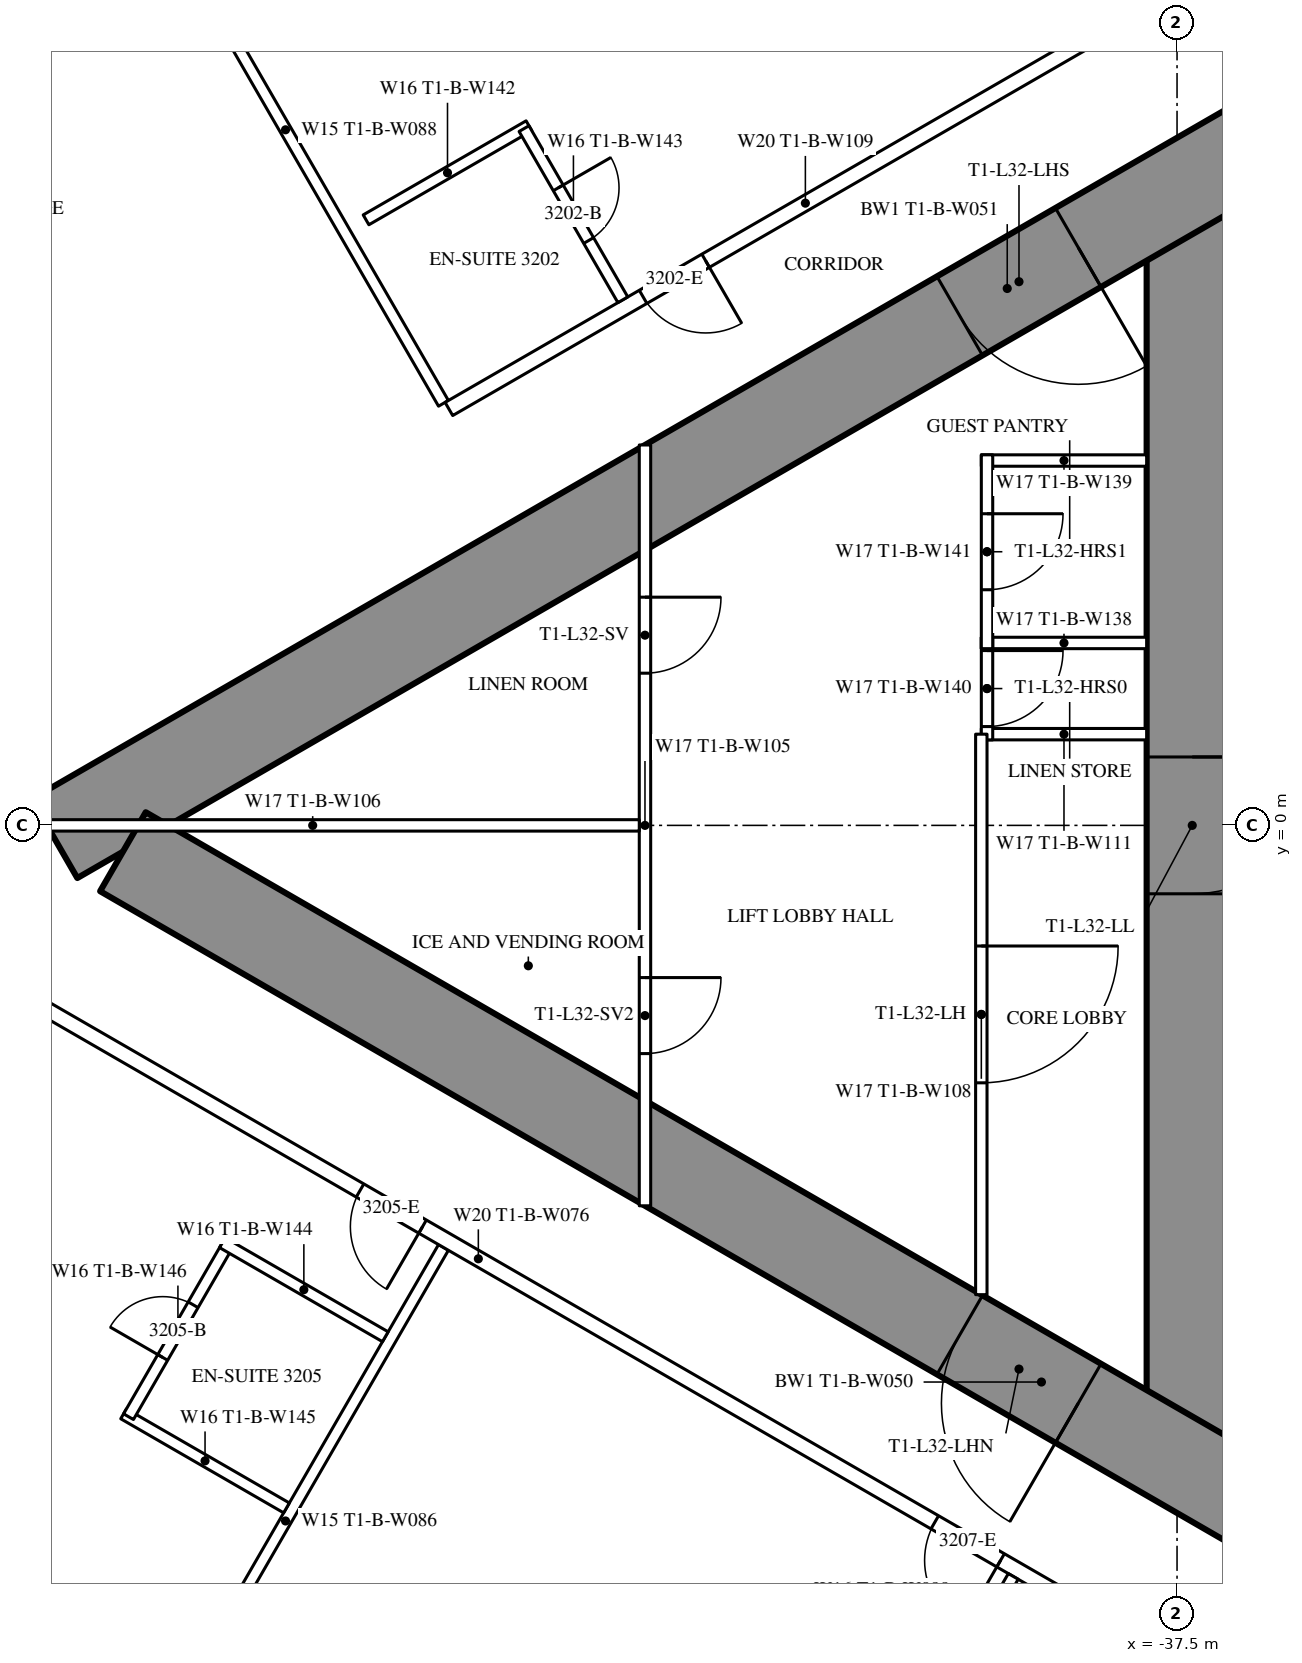
"""IFC4 building model, lengths in metres.
Left out: names, types, materials, properties, quantities, classifications, styles, units other than length and angle.
Written with IfcOpenShell. Run it as: python <this file> out.ifc"""

import sys

from ifc_helpers import new_model, si_unit, direction, frame, frame_2d, origin, place, context, subcontext, project, spatial, rectangle, extrude, element, fill, save


model = new_model("IFC4")
c1 = context("Model", 3, precision=1e-05, world=origin(), true_north=direction((0.0, 1.0)))
c2 = subcontext(c1, "Body", "Model", "MODEL_VIEW")
j1 = project(units=[si_unit("LENGTHUNIT", "METRE"), si_unit("PLANEANGLEUNIT", "RADIAN")], contexts=[c1])
p1 = place(None, origin())
s1 = spatial("IfcSite", under=j1, at=p1, CompositionType="ELEMENT")
p2 = place(p1, origin())
s2 = spatial("IfcBuilding", under=s1, at=p2, CompositionType="ELEMENT")
p3 = place(p2, frame((0.0, 0.0, 122.1)))
s3 = spatial("IfcBuildingStorey", under=s2, at=p3, CompositionType="ELEMENT", Elevation=122.1)
p4 = place(p3, frame((-37.3, 8.6, 0.0), z_axis=(0.0, 0.0, 1.0), x_axis=(0.0, -1.0, 0.0)))
e1 = element("IfcWall", 1, at=p4, inside=s3, PredefinedType="SHEAR", context=c2, shape_type="SweptSolid", body=[
    extrude(rectangle(XDim=17.2, YDim=1.2, at=frame_2d((8.6, 0.0))), origin(), (0.0, 0.0, 1.0), 3.5),
])
p5 = place(p4, frame((7.7, 0.0, 0.0)))
e2 = element("IfcOpeningElement", 2, at=p5, cuts=e1, PredefinedType="OPENING", context=c2, shape_type="SweptSolid", body=[
    extrude(rectangle(XDim=1.8, YDim=2.2, at=frame_2d((0.9, 1.1))), frame((0.0, 0.61, 0.0), z_axis=(0.0, -1.0, 0.0), x_axis=(1.0, 0.0, 0.0)), (0.0, 0.0, 1.0), 1.22),
])
p6 = place(p3, frame((-27.2, 14.3, 0.0), z_axis=(0.0, 0.0, 1.0), x_axis=(-0.866026593062, -0.499997940104, 0.0)))
e3 = element("IfcWall", 3, at=p6, inside=s3, PredefinedType="SHEAR", context=c2, shape_type="SweptSolid", body=[
    extrude(rectangle(XDim=28.946, YDim=1.2, at=frame_2d((14.473, 0.0))), origin(), (0.0, 0.0, 1.0), 3.5),
])
p7 = place(p6, frame((4.6, 0.0, 0.0)))
e4 = element("IfcOpeningElement", 4, at=p7, cuts=e3, PredefinedType="OPENING", context=c2, shape_type="SweptSolid", body=[
    extrude(rectangle(XDim=1.0, YDim=2.2, at=frame_2d((0.5, 1.1))), frame((0.0, 0.61, 0.0), z_axis=(0.0, -1.0, 0.0), x_axis=(1.0, 0.0, 0.0)), (0.0, 0.0, 1.0), 1.22),
])
p8 = place(p6, frame((13.395, 0.0, 0.0)))
e5 = element("IfcOpeningElement", 5, at=p8, cuts=e3, PredefinedType="OPENING", context=c2, shape_type="SweptSolid", body=[
    extrude(rectangle(XDim=1.8, YDim=2.2, at=frame_2d((0.9, 1.1))), frame((0.0, 0.61, 0.0), z_axis=(0.0, -1.0, 0.0), x_axis=(1.0, 0.0, 0.0)), (0.0, 0.0, 1.0), 1.22),
])
p9 = place(p3, frame((-27.2, -14.3, 0.0), z_axis=(0.0, 0.0, 1.0), x_axis=(-0.866024021859, 0.500002393557, 0.0)))
e6 = element("IfcWall", 6, at=p9, inside=s3, PredefinedType="SHEAR", context=c2, shape_type="SweptSolid", body=[
    extrude(rectangle(XDim=27.907, YDim=1.2, at=frame_2d((13.954, 0.0))), origin(), (0.0, 0.0, 1.0), 3.5),
])
p10 = place(p9, frame((4.6, 0.0, 0.0)))
e7 = element("IfcOpeningElement", 7, at=p10, cuts=e6, PredefinedType="OPENING", context=c2, shape_type="SweptSolid", body=[
    extrude(rectangle(XDim=1.0, YDim=2.2, at=frame_2d((0.5, 1.1))), frame((0.0, 0.61, 0.0), z_axis=(0.0, -1.0, 0.0), x_axis=(1.0, 0.0, 0.0)), (0.0, 0.0, 1.0), 1.22),
])
p11 = place(p9, frame((13.395, 0.0, 0.0)))
e8 = element("IfcOpeningElement", 8, at=p11, cuts=e6, PredefinedType="OPENING", context=c2, shape_type="SweptSolid", body=[
    extrude(rectangle(XDim=1.8, YDim=2.2, at=frame_2d((0.9, 1.1))), frame((0.0, 0.61, 0.0), z_axis=(0.0, -1.0, 0.0), x_axis=(1.0, 0.0, 0.0)), (0.0, 0.0, 1.0), 1.22),
])
for number, where, z_axis, x_axis in (
    (9, (-47.151, 5.552, 0.0), (0.0, 0.0, 1.0), (-0.5, 0.866, 0.0)),
    (10, (-47.151, -5.552, 0.0), (0.0, 0.0, 1.0), (-0.5, -0.866, 0.0)),
):
    element("IfcWall", number, at=place(p3, frame(where, z_axis=z_axis, x_axis=x_axis)), inside=s3, PredefinedType="PARTITIONING", context=c2, shape_type="SweptSolid", body=[
        extrude(rectangle(XDim=8.311, YDim=0.15, at=frame_2d((4.156, 0.0))), origin(), (0.0, 0.0, 1.0), 2.2),
    ])
p12 = place(p3, frame((-36.92, -11.344, 0.0), z_axis=(0.0, 0.0, 1.0), x_axis=(-0.866028313256, 0.499994960614, 0.0)))
e11 = element("IfcWall", 11, at=p12, inside=s3, PredefinedType="PARTITIONING", context=c2, shape_type="SweptSolid", body=[
    extrude(rectangle(XDim=22.568, YDim=0.2, at=frame_2d((11.284, 0.0))), origin(), (0.0, 0.0, 1.0), 3.25),
])
p13 = place(p12, frame((12.131, 0.0, 0.0)))
e12 = element("IfcOpeningElement", 12, at=p13, cuts=e11, PredefinedType="OPENING", context=c2, shape_type="SweptSolid", body=[
    extrude(rectangle(XDim=0.95, YDim=2.2, at=frame_2d((0.475, 1.1))), frame((0.0, 0.11, 0.0), z_axis=(0.0, -1.0, 0.0), x_axis=(1.0, 0.0, 0.0)), (0.0, 0.0, 1.0), 0.22),
])
p14 = place(p12, frame((3.35, 0.0, 0.0)))
e13 = element("IfcOpeningElement", 13, at=p14, cuts=e11, PredefinedType="OPENING", context=c2, shape_type="SweptSolid", body=[
    extrude(rectangle(XDim=1.0, YDim=2.2, at=frame_2d((0.5, 1.1))), frame((0.0, 0.11, 0.0), z_axis=(0.0, -1.0, 0.0), x_axis=(1.0, 0.0, 0.0)), (0.0, 0.0, 1.0), 0.22),
])
p15 = place(p3, frame((-37.7, 10.894, 0.0), z_axis=(0.0, 0.0, 1.0), x_axis=(-0.866027551079, -0.499996280759, 0.0)))
e14 = element("IfcWall", 14, at=p15, inside=s3, PredefinedType="PARTITIONING", context=c2, shape_type="SweptSolid", body=[
    extrude(rectangle(XDim=10.831, YDim=0.2, at=frame_2d((5.415, 0.0))), origin(), (0.0, 0.0, 1.0), 3.25),
])
p16 = place(p15, frame((6.93, 0.0, 0.0)))
e15 = element("IfcOpeningElement", 15, at=p16, cuts=e14, PredefinedType="OPENING", context=c2, shape_type="SweptSolid", body=[
    extrude(rectangle(XDim=0.95, YDim=2.2, at=frame_2d((0.475, 1.1))), frame((0.0, 0.11, 0.0), z_axis=(0.0, -1.0, 0.0), x_axis=(1.0, 0.0, 0.0)), (0.0, 0.0, 1.0), 0.22),
])
p17 = place(p3, frame((-49.216, -8.979, 0.0), z_axis=(0.0, 0.0, 1.0), x_axis=(-0.866031185235, 0.4999899861, 0.0)))
e16 = element("IfcWall", 16, at=p17, inside=s3, PredefinedType="PARTITIONING", context=c2, shape_type="SweptSolid", body=[
    extrude(rectangle(XDim=2.475, YDim=0.15, at=frame_2d((1.238, 0.0))), origin(), (0.0, 0.0, 1.0), 3.25),
])
p18 = place(p3, frame((-49.995, -5.527, 0.0), z_axis=(0.0, 0.0, 1.0), x_axis=(-0.500006934395, -0.866021400173, 0.0)))
e17 = element("IfcWall", 17, at=p18, inside=s3, PredefinedType="PARTITIONING", context=c2, shape_type="SweptSolid", body=[
    extrude(rectangle(XDim=2.6, YDim=0.15, at=frame_2d((1.3, 0.0))), origin(), (0.0, 0.0, 1.0), 3.25),
])
p19 = place(p18, frame((0.9, 0.0, 0.0)))
e18 = element("IfcOpeningElement", 18, at=p19, cuts=e17, PredefinedType="OPENING", context=c2, shape_type="SweptSolid", body=[
    extrude(rectangle(XDim=0.8, YDim=2.2, at=frame_2d((0.4, 1.1))), frame((0.0, 0.085, 0.0), z_axis=(0.0, -1.0, 0.0), x_axis=(1.0, 0.0, 0.0)), (0.0, 0.0, 1.0), 0.17),
])
p20 = place(p3, frame((-47.916, -6.727, 0.0), z_axis=(0.0, 0.0, 1.0), x_axis=(-0.866031185235, 0.4999899861, 0.0)))
e19 = element("IfcWall", 19, at=p20, inside=s3, PredefinedType="PARTITIONING", context=c2, shape_type="SweptSolid", body=[
    extrude(rectangle(XDim=2.475, YDim=0.15, at=frame_2d((1.238, 0.0))), origin(), (0.0, 0.0, 1.0), 3.25),
])
p21 = place(p3, frame((-46.026, 9.204, 0.0), z_axis=(0.0, 0.0, 1.0), x_axis=(-0.866006523861, -0.500032699561, 0.0)))
e20 = element("IfcWall", 20, at=p21, inside=s3, PredefinedType="PARTITIONING", context=c2, shape_type="SweptSolid", body=[
    extrude(rectangle(XDim=2.475, YDim=0.15, at=frame_2d((1.237, 0.0))), origin(), (0.0, 0.0, 1.0), 3.25),
])
p22 = place(p3, frame((-44.791, 6.915, 0.0), z_axis=(0.0, 0.0, 1.0), x_axis=(-0.500047596559, 0.865997922154, 0.0)))
e21 = element("IfcWall", 21, at=p22, inside=s3, PredefinedType="PARTITIONING", context=c2, shape_type="SweptSolid", body=[
    extrude(rectangle(XDim=2.6, YDim=0.15, at=frame_2d((1.3, 0.0))), origin(), (0.0, 0.0, 1.0), 3.25),
])
p23 = place(p22, frame((0.9, 0.0, 0.0)))
e22 = element("IfcOpeningElement", 22, at=p23, cuts=e21, PredefinedType="OPENING", context=c2, shape_type="SweptSolid", body=[
    extrude(rectangle(XDim=0.8, YDim=2.2, at=frame_2d((0.4, 1.1))), frame((0.0, 0.085, 0.0), z_axis=(0.0, -1.0, 0.0), x_axis=(1.0, 0.0, 0.0)), (0.0, 0.0, 1.0), 0.17),
])
p24 = place(p3, frame((-39.655, -9.88, 0.0), z_axis=(0.0, 0.0, 1.0), x_axis=(-0.500049511043, -0.865996816683, 0.0)))
e23 = element("IfcWall", 23, at=p24, inside=s3, PredefinedType="PARTITIONING", context=c2, shape_type="SweptSolid", body=[
    extrude(rectangle(XDim=2.8, YDim=0.15, at=frame_2d((1.4, 0.0))), origin(), (0.0, 0.0, 1.0), 3.25),
])
p25 = place(p24, frame((1.55, 0.0, 0.0)))
e24 = element("IfcOpeningElement", 24, at=p25, cuts=e23, PredefinedType="OPENING", context=c2, shape_type="SweptSolid", body=[
    extrude(rectangle(XDim=1.0, YDim=2.2, at=frame_2d((0.5, 1.1))), frame((0.0, 0.085, 0.0), z_axis=(0.0, -1.0, 0.0), x_axis=(1.0, 0.0, 0.0)), (0.0, 0.0, 1.0), 0.17),
])
for number, where, z_axis, x_axis in (
    (25, (-37.9, 1.2, 0.0), (0.0, 0.0, 1.0), (-1.0, 0.0, 0.0)),
    (26, (-37.9, 2.4, 0.0), (0.0, 0.0, 1.0), (-1.0, 0.0, 0.0)),
    (27, (-37.9, 4.8, 0.0), (0.0, 0.0, 1.0), (-1.0, 0.0, 0.0)),
):
    element("IfcWall", number, at=place(p3, frame(where, z_axis=z_axis, x_axis=x_axis)), inside=s3, PredefinedType="PARTITIONING", context=c2, shape_type="SweptSolid", body=[
        extrude(rectangle(XDim=2.175, YDim=0.15, at=frame_2d((1.087, 0.0))), origin(), (0.0, 0.0, 1.0), 3.25),
    ])
p26 = place(p3, frame((-40.0, 2.475, 0.0), z_axis=(0.0, 0.0, 1.0), x_axis=(0.0, -1.0, 0.0)))
e28 = element("IfcWall", 28, at=p26, inside=s3, PredefinedType="PARTITIONING", context=c2, shape_type="SweptSolid", body=[
    extrude(rectangle(XDim=1.35, YDim=0.15, at=frame_2d((0.675, 0.0))), origin(), (0.0, 0.0, 1.0), 3.25),
])
p27 = place(p26, frame((0.175, 0.0, 0.0)))
e29 = element("IfcOpeningElement", 29, at=p27, cuts=e28, PredefinedType="OPENING", context=c2, shape_type="SweptSolid", body=[
    extrude(rectangle(XDim=1.0, YDim=2.2, at=frame_2d((0.5, 1.1))), frame((0.0, 0.085, 0.0), z_axis=(0.0, -1.0, 0.0), x_axis=(1.0, 0.0, 0.0)), (0.0, 0.0, 1.0), 0.17),
])
p28 = place(p3, frame((-40.0, 4.875, 0.0), z_axis=(0.0, 0.0, 1.0), x_axis=(0.0, -1.0, 0.0)))
e30 = element("IfcWall", 30, at=p28, inside=s3, PredefinedType="PARTITIONING", context=c2, shape_type="SweptSolid", body=[
    extrude(rectangle(XDim=2.55, YDim=0.15, at=frame_2d((1.275, 0.0))), origin(), (0.0, 0.0, 1.0), 3.25),
])
p29 = place(p28, frame((0.775, 0.0, 0.0)))
e31 = element("IfcOpeningElement", 31, at=p29, cuts=e30, PredefinedType="OPENING", context=c2, shape_type="SweptSolid", body=[
    extrude(rectangle(XDim=1.0, YDim=2.2, at=frame_2d((0.5, 1.1))), frame((0.0, 0.085, 0.0), z_axis=(0.0, -1.0, 0.0), x_axis=(1.0, 0.0, 0.0)), (0.0, 0.0, 1.0), 0.17),
])
p30 = place(p3, frame((-40.075, 1.2, 0.0), z_axis=(0.0, 0.0, 1.0), x_axis=(0.0, -1.0, 0.0)))
e32 = element("IfcWall", 32, at=p30, inside=s3, PredefinedType="PARTITIONING", context=c2, shape_type="SweptSolid", body=[
    extrude(rectangle(XDim=7.374, YDim=0.15, at=frame_2d((3.687, 0.0))), origin(), (0.0, 0.0, 1.0), 3.25),
])
p31 = place(p30, frame((2.787, 0.0, 0.0)))
e33 = element("IfcOpeningElement", 33, at=p31, cuts=e32, PredefinedType="OPENING", context=c2, shape_type="SweptSolid", body=[
    extrude(rectangle(XDim=1.8, YDim=2.2, at=frame_2d((0.9, 1.1))), frame((0.0, 0.085, 0.0), z_axis=(0.0, -1.0, 0.0), x_axis=(1.0, 0.0, 0.0)), (0.0, 0.0, 1.0), 0.17),
])
p32 = place(p3, frame((-44.5, 5.005, 0.0), z_axis=(0.0, 0.0, 1.0), x_axis=(0.0, -1.0, 0.0)))
e34 = element("IfcWall", 34, at=p32, inside=s3, PredefinedType="PARTITIONING", context=c2, shape_type="SweptSolid", body=[
    extrude(rectangle(XDim=10.009, YDim=0.15, at=frame_2d((5.005, 0.0))), origin(), (0.0, 0.0, 1.0), 2.45),
])
p33 = place(p32, frame((2.002, 0.0, 0.0)))
e35 = element("IfcOpeningElement", 35, at=p33, cuts=e34, PredefinedType="OPENING", context=c2, shape_type="SweptSolid", body=[
    extrude(rectangle(XDim=1.0, YDim=2.2, at=frame_2d((0.5, 1.1))), frame((0.0, 0.085, 0.0), z_axis=(0.0, -1.0, 0.0), x_axis=(1.0, 0.0, 0.0)), (0.0, 0.0, 1.0), 0.17),
])
p34 = place(p32, frame((7.007, 0.0, 0.0)))
e36 = element("IfcOpeningElement", 36, at=p34, cuts=e34, PredefinedType="OPENING", context=c2, shape_type="SweptSolid", body=[
    extrude(rectangle(XDim=1.0, YDim=2.2, at=frame_2d((0.5, 1.1))), frame((0.0, 0.085, 0.0), z_axis=(0.0, -1.0, 0.0), x_axis=(1.0, 0.0, 0.0)), (0.0, 0.0, 1.0), 0.17),
])
p35 = place(p3, frame((-44.575, 0.0, 0.0), z_axis=(0.0, 0.0, 1.0), x_axis=(-1.0, 0.0, 0.0)))
e37 = element("IfcWall", 37, at=p35, inside=s3, PredefinedType="PARTITIONING", context=c2, shape_type="SweptSolid", body=[
    extrude(rectangle(XDim=8.593, YDim=0.15, at=frame_2d((4.297, 0.0))), origin(), (0.0, 0.0, 1.0), 2.2),
])
p36 = place(p19, origin())
e38 = element("IfcDoor", 38, at=p36, inside=s3, OperationType="SINGLE_SWING_RIGHT", PredefinedType="DOOR", context=c2, shape_type="SweptSolid", body=[
    extrude(rectangle(XDim=0.8, YDim=2.2, at=frame_2d((0.4, 1.1))), frame((0.0, 0.025, 0.0), z_axis=(0.0, -1.0, 0.0), x_axis=(1.0, 0.0, 0.0)), (0.0, 0.0, 1.0), 0.05),
])
fill(e18, e38)
p37 = place(p13, origin())
e39 = element("IfcDoor", 39, at=p37, inside=s3, OperationType="SINGLE_SWING_LEFT", PredefinedType="DOOR", context=c2, shape_type="SweptSolid", body=[
    extrude(rectangle(XDim=0.95, YDim=2.2, at=frame_2d((0.475, 1.1))), frame((0.0, 0.025, 0.0), z_axis=(0.0, -1.0, 0.0), x_axis=(1.0, 0.0, 0.0)), (0.0, 0.0, 1.0), 0.05),
])
fill(e12, e39)
p38 = place(p23, origin())
e40 = element("IfcDoor", 40, at=p38, inside=s3, OperationType="SINGLE_SWING_RIGHT", PredefinedType="DOOR", context=c2, shape_type="SweptSolid", body=[
    extrude(rectangle(XDim=0.8, YDim=2.2, at=frame_2d((0.4, 1.1))), frame((0.0, 0.025, 0.0), z_axis=(0.0, -1.0, 0.0), x_axis=(1.0, 0.0, 0.0)), (0.0, 0.0, 1.0), 0.05),
])
fill(e22, e40)
p39 = place(p16, origin())
e41 = element("IfcDoor", 41, at=p39, inside=s3, OperationType="SINGLE_SWING_LEFT", PredefinedType="DOOR", context=c2, shape_type="SweptSolid", body=[
    extrude(rectangle(XDim=0.95, YDim=2.2, at=frame_2d((0.475, 1.1))), frame((0.0, 0.025, 0.0), z_axis=(0.0, -1.0, 0.0), x_axis=(1.0, 0.0, 0.0)), (0.0, 0.0, 1.0), 0.05),
])
fill(e15, e41)
p40 = place(p14, origin())
e42 = element("IfcDoor", 42, at=p40, inside=s3, OperationType="SINGLE_SWING_LEFT", PredefinedType="DOOR", context=c2, shape_type="SweptSolid", body=[
    extrude(rectangle(XDim=1.0, YDim=2.2, at=frame_2d((0.5, 1.1))), frame((0.0, 0.025, 0.0), z_axis=(0.0, -1.0, 0.0), x_axis=(1.0, 0.0, 0.0)), (0.0, 0.0, 1.0), 0.05),
])
fill(e13, e42)
p41 = place(p27, origin())
e43 = element("IfcDoor", 43, at=p41, inside=s3, OperationType="SINGLE_SWING_LEFT", PredefinedType="DOOR", context=c2, shape_type="SweptSolid", body=[
    extrude(rectangle(XDim=1.0, YDim=2.2, at=frame_2d((0.5, 1.1))), frame((0.0, 0.025, 0.0), z_axis=(0.0, -1.0, 0.0), x_axis=(1.0, 0.0, 0.0)), (0.0, 0.0, 1.0), 0.05),
])
fill(e29, e43)
p42 = place(p29, origin())
e44 = element("IfcDoor", 44, at=p42, inside=s3, OperationType="SINGLE_SWING_LEFT", PredefinedType="DOOR", context=c2, shape_type="SweptSolid", body=[
    extrude(rectangle(XDim=1.0, YDim=2.2, at=frame_2d((0.5, 1.1))), frame((0.0, 0.025, 0.0), z_axis=(0.0, -1.0, 0.0), x_axis=(1.0, 0.0, 0.0)), (0.0, 0.0, 1.0), 0.05),
])
fill(e31, e44)
p43 = place(p31, origin())
e45 = element("IfcDoor", 45, at=p43, inside=s3, OperationType="DOUBLE_DOOR_SINGLE_SWING", PredefinedType="DOOR", context=c2, shape_type="SweptSolid", body=[
    extrude(rectangle(XDim=1.8, YDim=2.2, at=frame_2d((0.9, 1.1))), frame((0.0, 0.025, 0.0), z_axis=(0.0, -1.0, 0.0), x_axis=(1.0, 0.0, 0.0)), (0.0, 0.0, 1.0), 0.05),
])
fill(e33, e45)
p44 = place(p33, origin())
e46 = element("IfcDoor", 46, at=p44, inside=s3, OperationType="SINGLE_SWING_LEFT", PredefinedType="DOOR", context=c2, shape_type="SweptSolid", body=[
    extrude(rectangle(XDim=1.0, YDim=2.2, at=frame_2d((0.5, 1.1))), frame((0.0, 0.025, 0.0), z_axis=(0.0, -1.0, 0.0), x_axis=(1.0, 0.0, 0.0)), (0.0, 0.0, 1.0), 0.05),
])
fill(e35, e46)
p45 = place(p34, origin())
e47 = element("IfcDoor", 47, at=p45, inside=s3, OperationType="SINGLE_SWING_LEFT", PredefinedType="DOOR", context=c2, shape_type="SweptSolid", body=[
    extrude(rectangle(XDim=1.0, YDim=2.2, at=frame_2d((0.5, 1.1))), frame((0.0, 0.025, 0.0), z_axis=(0.0, -1.0, 0.0), x_axis=(1.0, 0.0, 0.0)), (0.0, 0.0, 1.0), 0.05),
])
fill(e36, e47)
p46 = place(p8, origin())
e48 = element("IfcDoor", 48, at=p46, inside=s3, OperationType="DOUBLE_DOOR_SINGLE_SWING", PredefinedType="DOOR", context=c2, shape_type="SweptSolid", body=[
    extrude(rectangle(XDim=1.8, YDim=2.2, at=frame_2d((0.9, 1.1))), frame((0.0, 0.025, 0.0), z_axis=(0.0, -1.0, 0.0), x_axis=(1.0, 0.0, 0.0)), (0.0, 0.0, 1.0), 0.05),
])
fill(e5, e48)
p47 = place(p11, origin())
e49 = element("IfcDoor", 49, at=p47, inside=s3, OperationType="DOUBLE_DOOR_SINGLE_SWING", PredefinedType="DOOR", context=c2, shape_type="SweptSolid", body=[
    extrude(rectangle(XDim=1.8, YDim=2.2, at=frame_2d((0.9, 1.1))), frame((0.0, 0.025, 0.0), z_axis=(0.0, -1.0, 0.0), x_axis=(1.0, 0.0, 0.0)), (0.0, 0.0, 1.0), 0.05),
])
fill(e8, e49)
p48 = place(p5, origin())
e50 = element("IfcDoor", 50, at=p48, inside=s3, OperationType="DOUBLE_DOOR_SINGLE_SWING", PredefinedType="DOOR", context=c2, shape_type="SweptSolid", body=[
    extrude(rectangle(XDim=1.8, YDim=2.2, at=frame_2d((0.9, 1.1))), frame((0.0, 0.025, 0.0), z_axis=(0.0, -1.0, 0.0), x_axis=(1.0, 0.0, 0.0)), (0.0, 0.0, 1.0), 0.05),
])
fill(e2, e50)
save(model, sys.argv[1])
